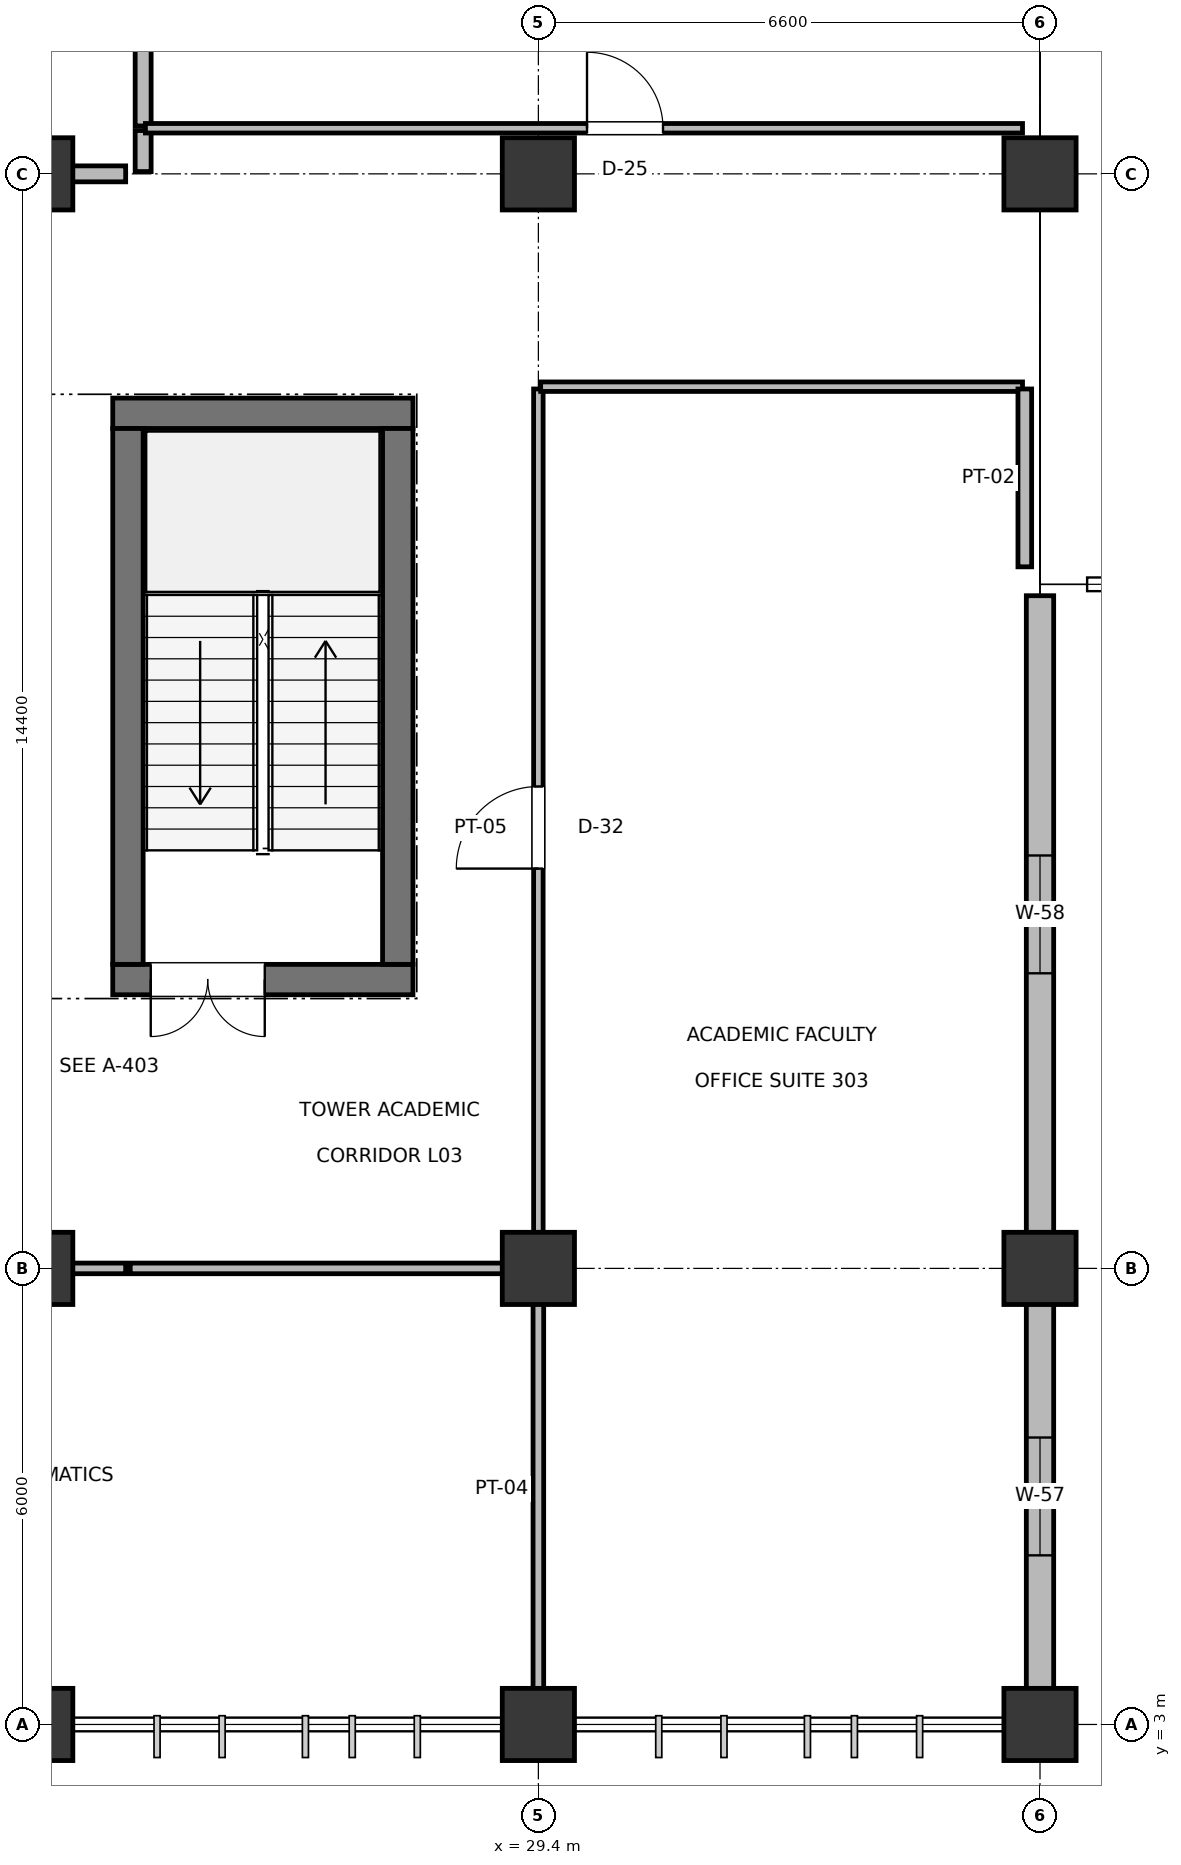
"""IFC4 building model, lengths in metres.
Left out: names, types, materials, properties, quantities, classifications, styles, units other than length and angle.
Written with IfcOpenShell. Run it as: python <this file> out.ifc"""

import sys

from ifc_helpers import new_model, si_unit, direction, frame, frame_2d, origin, origin_2d, place, context, subcontext, project, spatial, rectangle, extrude, element, fill, save


model = new_model("IFC4")
c1 = context("Model", 3, precision=1e-05, world=origin(), true_north=direction((0.0, 1.0)))
c2 = subcontext(c1, "Body", "Model", "MODEL_VIEW")
j1 = project(units=[si_unit("LENGTHUNIT", "METRE"), si_unit("PLANEANGLEUNIT", "RADIAN")], contexts=[c1])
p1 = place(None, origin())
s1 = spatial("IfcSite", under=j1, at=p1, CompositionType="ELEMENT")
p2 = place(p1, origin())
s2 = spatial("IfcBuilding", under=s1, at=p2, CompositionType="ELEMENT")
p3 = place(p2, frame((0.0, 0.0, 15.0)))
s3 = spatial("IfcBuildingStorey", under=s2, at=p3, CompositionType="ELEMENT", Elevation=15.0)
for number, where, z_axis, x_axis in (
    (1, (22.8, 3.0, 0.0), (0.0, 0.0, 1.0), (1.0, 0.0, 0.0)),
    (2, (22.8, 9.0, 0.0), (0.0, 0.0, 1.0), (1.0, 0.0, 0.0)),
    (3, (22.8, 23.4, 0.0), (0.0, 0.0, 1.0), (1.0, 0.0, 0.0)),
    (4, (29.4, 3.0, 0.0), (0.0, 0.0, 1.0), (1.0, 0.0, 0.0)),
    (5, (29.4, 9.0, 0.0), (0.0, 0.0, 1.0), (1.0, 0.0, 0.0)),
    (6, (29.4, 23.4, 0.0), (0.0, 0.0, 1.0), (1.0, 0.0, 0.0)),
    (7, (36.0, 3.0, 0.0), (0.0, 0.0, 1.0), (1.0, 0.0, 0.0)),
    (8, (36.0, 9.0, 0.0), (0.0, 0.0, 1.0), (1.0, 0.0, 0.0)),
    (9, (36.0, 23.4, 0.0), (0.0, 0.0, 1.0), (1.0, 0.0, 0.0)),
):
    element("IfcColumn", number, at=place(p3, frame(where, z_axis=z_axis, x_axis=x_axis)), inside=s3, PredefinedType="COLUMN", context=c2, shape_type="SweptSolid", body=[
        extrude(rectangle(XDim=0.95, YDim=0.95, at=origin_2d()), origin(), (0.0, 0.0, 1.0), 4.5),
    ])
p4 = place(p3, frame((36.0, 3.465, 0.0), z_axis=(0.0, 0.0, 1.0), x_axis=(0.0, 1.0, 0.0)))
e10 = element("IfcWall", 10, at=p4, inside=s3, PredefinedType="SOLIDWALL", context=c2, shape_type="SweptSolid", body=[
    extrude(rectangle(XDim=5.07, YDim=0.36, at=frame_2d((2.535, 0.0))), origin(), (0.0, 0.0, 1.0), 3.625),
])
p5 = place(p4, frame((1.76, 0.0, 0.9)))
e11 = element("IfcOpeningElement", 11, at=p5, cuts=e10, PredefinedType="OPENING", context=c2, shape_type="SweptSolid", body=[
    extrude(rectangle(XDim=1.55, YDim=1.15, at=frame_2d((0.775, 0.575))), frame((0.0, 0.19, 0.0), z_axis=(0.0, -1.0, 0.0), x_axis=(1.0, 0.0, 0.0)), (0.0, 0.0, 1.0), 0.38),
])
p6 = place(p3, frame((36.0, 9.465, 0.0), z_axis=(0.0, 0.0, 1.0), x_axis=(0.0, 1.0, 0.0)))
e12 = element("IfcWall", 12, at=p6, inside=s3, PredefinedType="SOLIDWALL", context=c2, shape_type="SweptSolid", body=[
    extrude(rectangle(XDim=8.385, YDim=0.36, at=frame_2d((4.192, 0.0))), origin(), (0.0, 0.0, 1.0), 3.425),
])
p7 = place(p6, frame((3.417, 0.0, 0.9)))
e13 = element("IfcOpeningElement", 13, at=p7, cuts=e12, PredefinedType="OPENING", context=c2, shape_type="SweptSolid", body=[
    extrude(rectangle(XDim=1.55, YDim=1.35, at=frame_2d((0.775, 0.675))), frame((0.0, 0.19, 0.0), z_axis=(0.0, -1.0, 0.0), x_axis=(1.0, 0.0, 0.0)), (0.0, 0.0, 1.0), 0.38),
])
p8 = place(p3, frame((23.8, 12.8, 0.0), z_axis=(0.0, 0.0, 1.0), x_axis=(1.0, 0.0, 0.0)))
e14 = element("IfcWall", 14, at=p8, inside=s3, PredefinedType="SHEAR", context=c2, shape_type="SweptSolid", body=[
    extrude(rectangle(XDim=3.95, YDim=0.4, at=frame_2d((1.975, 0.0))), origin(), (0.0, 0.0, 1.0), 4.28),
])
p9 = place(p8, frame((0.5, 0.0, 0.0)))
e15 = element("IfcOpeningElement", 15, at=p9, cuts=e14, PredefinedType="OPENING", context=c2, shape_type="SweptSolid", body=[
    extrude(rectangle(XDim=1.5, YDim=2.2, at=frame_2d((0.75, 1.1))), frame((0.0, 0.21, 0.0), z_axis=(0.0, -1.0, 0.0), x_axis=(1.0, 0.0, 0.0)), (0.0, 0.0, 1.0), 0.42),
])
p10 = place(p3, frame((23.8, 20.25, 0.0), z_axis=(0.0, 0.0, 1.0), x_axis=(1.0, 0.0, 0.0)))
e16 = element("IfcWall", 16, at=p10, inside=s3, PredefinedType="SHEAR", context=c2, shape_type="SweptSolid", body=[
    extrude(rectangle(XDim=3.95, YDim=0.4, at=frame_2d((1.975, 0.0))), origin(), (0.0, 0.0, 1.0), 4.28),
])
for number, where, z_axis, x_axis in (
    (17, (24.0, 13.0, 0.0), (0.0, 0.0, 1.0), (0.0, 1.0, 0.0)),
    (18, (27.55, 13.0, 0.0), (0.0, 0.0, 1.0), (0.0, 1.0, 0.0)),
):
    element("IfcWall", number, at=place(p3, frame(where, z_axis=z_axis, x_axis=x_axis)), inside=s3, PredefinedType="SHEAR", context=c2, shape_type="SweptSolid", body=[
        extrude(rectangle(XDim=7.05, YDim=0.4, at=frame_2d((3.525, 0.0))), origin(), (0.0, 0.0, 1.0), 4.28),
    ])
p11 = place(p3, frame((29.4, 3.23, 0.0), z_axis=(0.0, 0.0, 1.0), x_axis=(0.0, 1.0, 0.0)))
e19 = element("IfcWall", 19, at=p11, inside=s3, PredefinedType="PARTITIONING", context=c2, shape_type="SweptSolid", body=[
    extrude(rectangle(XDim=5.74, YDim=0.14, at=frame_2d((2.87, 0.0))), origin(), (0.0, 0.0, 1.0), 3.625),
])
p12 = place(p3, frame((24.03, 9.0, 0.0), z_axis=(0.0, 0.0, 1.0), x_axis=(1.0, 0.0, 0.0)))
e20 = element("IfcWall", 20, at=p12, inside=s3, PredefinedType="PARTITIONING", context=c2, shape_type="SweptSolid", body=[
    extrude(rectangle(XDim=5.34, YDim=0.14, at=frame_2d((2.67, 0.0))), origin(), (0.0, 0.0, 1.0), 3.495),
])
p13 = place(p3, frame((13.83, 9.0, 0.0), z_axis=(0.0, 0.0, 1.0), x_axis=(1.0, 0.0, 0.0)))
e21 = element("IfcWall", 21, at=p13, inside=s3, PredefinedType="PARTITIONING", context=c2, shape_type="SweptSolid", body=[
    extrude(rectangle(XDim=10.14, YDim=0.14, at=frame_2d((5.07, 0.0))), origin(), (0.0, 0.0, 1.0), 3.495),
])
p14 = place(p13, frame((4.495, 0.0, 0.0)))
e22 = element("IfcOpeningElement", 22, at=p14, cuts=e21, PredefinedType="OPENING", context=c2, shape_type="SweptSolid", body=[
    extrude(rectangle(XDim=1.15, YDim=2.15, at=frame_2d((0.575, 1.075))), frame((0.0, 0.08, 0.0), z_axis=(0.0, -1.0, 0.0), x_axis=(1.0, 0.0, 0.0)), (0.0, 0.0, 1.0), 0.16),
])
p15 = place(p3, frame((29.4, 9.03, 0.0), z_axis=(0.0, 0.0, 1.0), x_axis=(0.0, 1.0, 0.0)))
e23 = element("IfcWall", 23, at=p15, inside=s3, PredefinedType="PARTITIONING", context=c2, shape_type="SweptSolid", body=[
    extrude(rectangle(XDim=11.54, YDim=0.125, at=frame_2d((5.77, 0.0))), origin(), (0.0, 0.0, 1.0), 3.425),
])
p16 = place(p15, frame((5.23, 0.0, 0.0)))
e24 = element("IfcOpeningElement", 24, at=p16, cuts=e23, PredefinedType="OPENING", context=c2, shape_type="SweptSolid", body=[
    extrude(rectangle(XDim=1.08, YDim=2.15, at=frame_2d((0.54, 1.075))), frame((0.0, 0.073, 0.0), z_axis=(0.0, -1.0, 0.0), x_axis=(1.0, 0.0, 0.0)), (0.0, 0.0, 1.0), 0.145),
])
p17 = place(p3, frame((29.43, 20.6, 0.0), z_axis=(0.0, 0.0, 1.0), x_axis=(1.0, 0.0, 0.0)))
e25 = element("IfcWall", 25, at=p17, inside=s3, PredefinedType="PARTITIONING", context=c2, shape_type="SweptSolid", body=[
    extrude(rectangle(XDim=6.34, YDim=0.125, at=frame_2d((3.17, 0.0))), origin(), (0.0, 0.0, 1.0), 3.425),
])
p18 = place(p3, frame((35.8, 18.23, 0.0), z_axis=(0.0, 0.0, 1.0), x_axis=(0.0, 1.0, 0.0)))
e26 = element("IfcWall", 26, at=p18, inside=s3, PredefinedType="PARTITIONING", context=c2, shape_type="SweptSolid", body=[
    extrude(rectangle(XDim=2.34, YDim=0.18, at=frame_2d((1.17, 0.0))), origin(), (0.0, 0.0, 1.0), 3.425),
])
p19 = place(p3, frame((24.2, 24.03, 0.0), z_axis=(0.0, 0.0, 1.0), x_axis=(0.0, 1.0, 0.0)))
e27 = element("IfcWall", 27, at=p19, inside=s3, PredefinedType="PLUMBINGWALL", context=c2, shape_type="SweptSolid", body=[
    extrude(rectangle(XDim=5.74, YDim=0.21, at=frame_2d((2.87, 0.0))), origin(), (0.0, 0.0, 1.0), 3.435),
])
p20 = place(p3, frame((24.2, 23.43, 0.0), z_axis=(0.0, 0.0, 1.0), x_axis=(0.0, 1.0, 0.0)))
e28 = element("IfcWall", 28, at=p20, inside=s3, PredefinedType="PLUMBINGWALL", context=c2, shape_type="SweptSolid", body=[
    extrude(rectangle(XDim=0.54, YDim=0.21, at=frame_2d((0.27, 0.0))), origin(), (0.0, 0.0, 1.0), 3.755),
])
p21 = place(p3, frame((17.83, 23.4, 0.0), z_axis=(0.0, 0.0, 1.0), x_axis=(1.0, 0.0, 0.0)))
e29 = element("IfcWall", 29, at=p21, inside=s3, PredefinedType="PLUMBINGWALL", context=c2, shape_type="SweptSolid", body=[
    extrude(rectangle(XDim=6.14, YDim=0.21, at=frame_2d((3.07, 0.0))), origin(), (0.0, 0.0, 1.0), 3.525),
])
p22 = place(p3, frame((24.23, 24.0, 0.0), z_axis=(0.0, 0.0, 1.0), x_axis=(1.0, 0.0, 0.0)))
e30 = element("IfcWall", 30, at=p22, inside=s3, PredefinedType="PARTITIONING", context=c2, shape_type="SweptSolid", body=[
    extrude(rectangle(XDim=11.54, YDim=0.125, at=frame_2d((5.77, 0.0))), origin(), (0.0, 0.0, 1.0), 3.605),
])
p23 = place(p22, frame((5.81, 0.0, 0.0)))
e31 = element("IfcOpeningElement", 31, at=p23, cuts=e30, PredefinedType="OPENING", context=c2, shape_type="SweptSolid", body=[
    extrude(rectangle(XDim=1.0, YDim=2.15, at=frame_2d((0.5, 1.075))), frame((0.0, 0.073, 0.0), z_axis=(0.0, -1.0, 0.0), x_axis=(1.0, 0.0, 0.0)), (0.0, 0.0, 1.0), 0.145),
])
p24 = place(p5, frame((1.55, 0.0, 0.0), z_axis=(0.0, 0.0, 1.0), x_axis=(-1.0, 0.0, 0.0)))
e32 = element("IfcWindow", 32, at=p24, inside=s3, PartitioningType="DOUBLE_PANEL_VERTICAL", PredefinedType="WINDOW", context=c2, shape_type="SweptSolid", body=[
    extrude(rectangle(XDim=1.55, YDim=1.15, at=frame_2d((0.775, 0.575))), frame((0.0, 0.03, 0.0), z_axis=(0.0, -1.0, 0.0), x_axis=(1.0, 0.0, 0.0)), (0.0, 0.0, 1.0), 0.06),
])
fill(e11, e32)
p25 = place(p7, frame((1.55, 0.0, 0.0), z_axis=(0.0, 0.0, 1.0), x_axis=(-1.0, 0.0, 0.0)))
e33 = element("IfcWindow", 33, at=p25, inside=s3, PartitioningType="DOUBLE_PANEL_VERTICAL", PredefinedType="WINDOW", context=c2, shape_type="SweptSolid", body=[
    extrude(rectangle(XDim=1.55, YDim=1.35, at=frame_2d((0.775, 0.675))), frame((0.0, 0.03, 0.0), z_axis=(0.0, -1.0, 0.0), x_axis=(1.0, 0.0, 0.0)), (0.0, 0.0, 1.0), 0.06),
])
fill(e13, e33)
p26 = place(p9, frame((1.5, 0.0, 0.0), z_axis=(0.0, 0.0, 1.0), x_axis=(-1.0, 0.0, 0.0)))
e34 = element("IfcDoor", 34, at=p26, inside=s3, OperationType="DOUBLE_DOOR_SINGLE_SWING", PredefinedType="DOOR", context=c2, shape_type="SweptSolid", body=[
    extrude(rectangle(XDim=1.5, YDim=2.2, at=frame_2d((0.75, 1.1))), frame((0.0, 0.025, 0.0), z_axis=(0.0, -1.0, 0.0), x_axis=(1.0, 0.0, 0.0)), (0.0, 0.0, 1.0), 0.05),
])
fill(e15, e34)
p27 = place(p16, origin())
e35 = element("IfcDoor", 35, at=p27, inside=s3, OperationType="SINGLE_SWING_LEFT", PredefinedType="DOOR", context=c2, shape_type="SweptSolid", body=[
    extrude(rectangle(XDim=1.08, YDim=2.15, at=frame_2d((0.54, 1.075))), frame((0.0, 0.025, 0.0), z_axis=(0.0, -1.0, 0.0), x_axis=(1.0, 0.0, 0.0)), (0.0, 0.0, 1.0), 0.05),
])
fill(e24, e35)
p28 = place(p23, origin())
e36 = element("IfcDoor", 36, at=p28, inside=s3, OperationType="SINGLE_SWING_LEFT", PredefinedType="DOOR", context=c2, shape_type="SweptSolid", body=[
    extrude(rectangle(XDim=1.0, YDim=2.15, at=frame_2d((0.5, 1.075))), frame((0.0, 0.025, 0.0), z_axis=(0.0, -1.0, 0.0), x_axis=(1.0, 0.0, 0.0)), (0.0, 0.0, 1.0), 0.05),
])
fill(e31, e36)
save(model, sys.argv[1])
